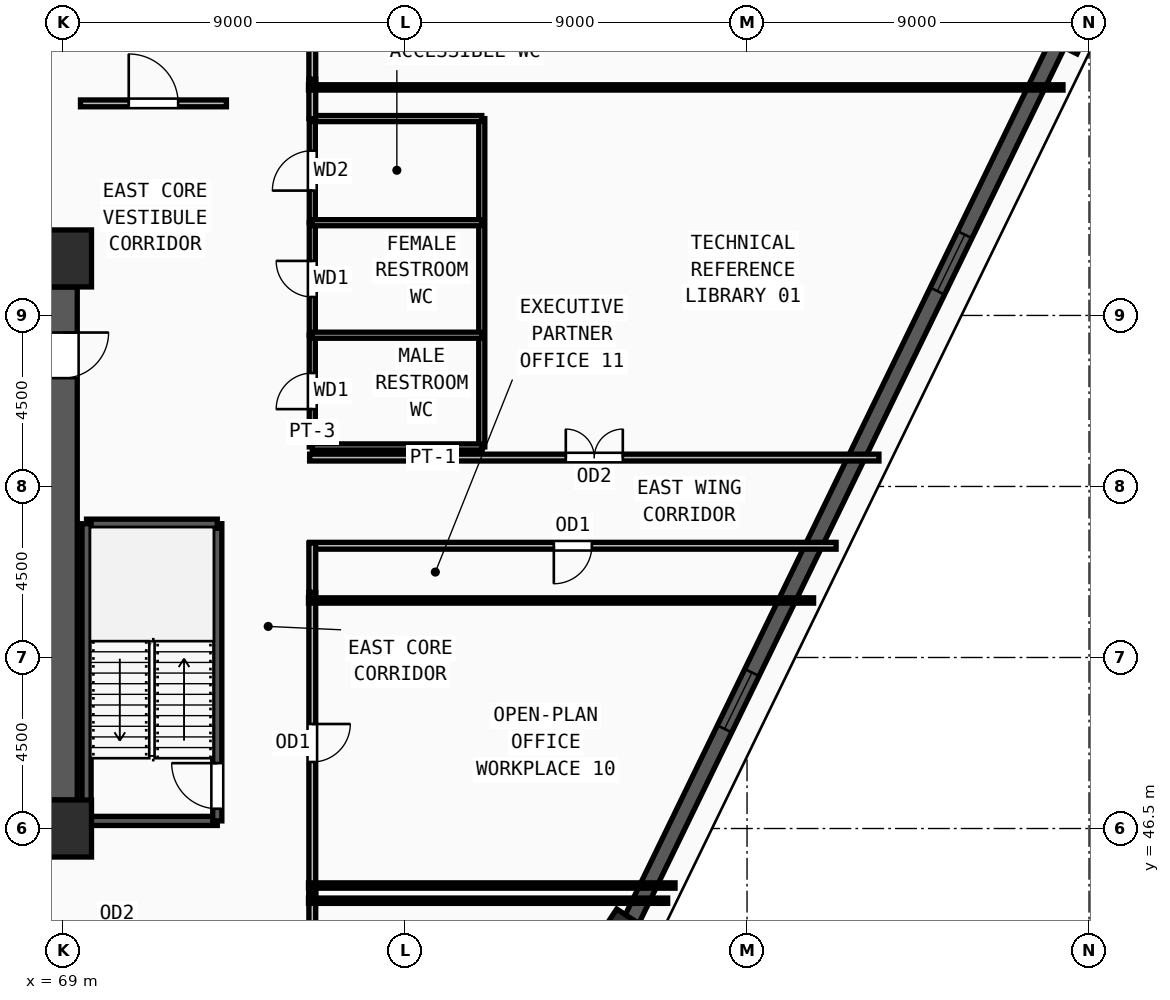
"""IFC4 building model, lengths in metres.
Left out: names, types, materials, properties, quantities, classifications, styles, units other than length and angle.
Written with IfcOpenShell. Run it as: python <this file> out.ifc"""

import sys

from ifc_helpers import new_model, si_unit, direction, frame, frame_2d, origin, origin_2d, place, context, subcontext, project, spatial, rectangle, extrude, source, transform, mapped, element, fill, save


model = new_model("IFC4")
c1 = context("Model", 3, precision=1e-05, world=origin(), true_north=direction((0.0, 1.0)))
c2 = subcontext(c1, "Body", "Model", "MODEL_VIEW")
j1 = project(units=[si_unit("LENGTHUNIT", "METRE"), si_unit("PLANEANGLEUNIT", "RADIAN")], contexts=[c1])
p1 = place(None, origin())
s1 = spatial("IfcSite", under=j1, at=p1, CompositionType="ELEMENT")
p2 = place(p1, origin())
s2 = spatial("IfcBuilding", under=s1, at=p2, CompositionType="ELEMENT")
p3 = place(p2, frame((0.0, 0.0, 144.0)))
s3 = spatial("IfcBuildingStorey", under=s2, at=p3, CompositionType="ELEMENT", Elevation=144.0)
m1 = source(origin(), c2, "Body", "SweptSolid", [
    extrude(rectangle(XDim=1.5, YDim=1.5, at=origin_2d()), origin(), (0.0, 0.0, 1.0), 3.75),
])
for number, where, z_axis, x_axis in (
    (1, (69.0, 46.5, 0.0), (0.0, 0.0, 1.0), (1.0, 0.0, 0.0)),
    (2, (69.0, 61.5, 0.0), (0.0, 0.0, 1.0), (1.0, 0.0, 0.0)),
):
    element("IfcColumn", number, at=place(p3, frame(where, z_axis=z_axis, x_axis=x_axis)), inside=s3, PredefinedType="COLUMN", context=c2, shape_type="MappedRepresentation", body=[
        mapped(m1, transform((0.0, 0.0, 0.0), x_axis=(1.0, 0.0, 0.0), y_axis=(0.0, 1.0, 0.0), z_axis=(0.0, 0.0, 1.0), scale=1.0)),
    ])
m2 = source(origin(), c2, "Body", "SweptSolid", [
    extrude(rectangle(XDim=1.4, YDim=1.15, at=origin_2d()), origin(), (0.0, 0.0, 1.0), 3.75),
])
for number, where, z_axis, x_axis in (
    (3, (95.472, 67.764, 0.0), (0.0, 0.0, 1.0), (0.437, 0.899, 0.0)),
    (4, (83.666, 43.481, 0.0), (0.0, 0.0, 1.0), (0.55, 0.835, 0.0)),
):
    element("IfcColumn", number, at=place(p3, frame(where, z_axis=z_axis, x_axis=x_axis)), inside=s3, PredefinedType="COLUMN", context=c2, shape_type="MappedRepresentation", body=[
        mapped(m2, transform((0.0, 0.0, 0.0), x_axis=(1.0, 0.0, 0.0), y_axis=(0.0, 1.0, 0.0), z_axis=(0.0, 0.0, 1.0), scale=1.0)),
    ])
p4 = place(p3, frame((83.968, 44.102, 0.0), z_axis=(0.0, 0.0, 1.0), x_axis=(0.437237241279, 0.899346204105, 0.0)))
e5 = element("IfcWall", 5, at=p4, inside=s3, PredefinedType="SOLIDWALL", context=c2, shape_type="SweptSolid", body=[
    extrude(rectangle(XDim=25.62, YDim=0.42, at=frame_2d((12.81, 0.0))), origin(), (0.0, 0.0, 1.0), 3.57),
])
m3 = source(origin(), c2, "Body", "SweptSolid", [
    extrude(rectangle(XDim=1.65, YDim=1.95, at=frame_2d((0.825, 0.975))), frame((0.0, 0.22, 0.0), z_axis=(0.0, -1.0, 0.0), x_axis=(1.0, 0.0, 0.0)), (0.0, 0.0, 1.0), 0.44),
])
p5 = place(p4, frame((5.58, 0.0, 0.55)))
e6 = element("IfcOpeningElement", 6, at=p5, cuts=e5, PredefinedType="OPENING", context=c2, shape_type="MappedRepresentation", body=[
    mapped(m3, transform((0.0, 0.0, 0.0), x_axis=(1.0, 0.0, 0.0), y_axis=(0.0, 1.0, 0.0), z_axis=(0.0, 0.0, 1.0), scale=1.0)),
])
p6 = place(p4, frame((18.39, 0.0, 0.55)))
e7 = element("IfcOpeningElement", 7, at=p6, cuts=e5, PredefinedType="OPENING", context=c2, shape_type="MappedRepresentation", body=[
    mapped(m3, transform((0.0, 0.0, 0.0), x_axis=(1.0, 0.0, 0.0), y_axis=(0.0, 1.0, 0.0), z_axis=(0.0, 0.0, 1.0), scale=1.0)),
])
p7 = place(p3, frame((69.0, 60.75, 0.0), z_axis=(0.0, 0.0, 1.0), x_axis=(0.0, -1.0, 0.0)))
e8 = element("IfcWall", 8, at=p7, inside=s3, PredefinedType="SHEAR", context=c2, shape_type="SweptSolid", body=[
    extrude(rectangle(XDim=13.5, YDim=0.75, at=frame_2d((6.75, 0.0))), origin(), (0.0, 0.0, 1.0), 3.57),
])
m4 = source(origin(), c2, "Body", "SweptSolid", [
    extrude(rectangle(XDim=1.2, YDim=2.2, at=frame_2d((0.6, 1.1))), frame((0.0, 0.385, 0.0), z_axis=(0.0, -1.0, 0.0), x_axis=(1.0, 0.0, 0.0)), (0.0, 0.0, 1.0), 0.77),
])
p8 = place(p7, frame((1.2, 0.0, 0.0)))
e9 = element("IfcOpeningElement", 9, at=p8, cuts=e8, PredefinedType="OPENING", context=c2, shape_type="MappedRepresentation", body=[
    mapped(m4, transform((0.0, 0.0, 0.0), x_axis=(1.0, 0.0, 0.0), y_axis=(0.0, 1.0, 0.0), z_axis=(0.0, 0.0, 1.0), scale=1.0)),
])
p9 = place(p3, frame((69.62, 46.7, 0.0), z_axis=(0.0, 0.0, 1.0), x_axis=(1.0, 0.0, 0.0)))
e10 = element("IfcWall", 10, at=p9, inside=s3, PredefinedType="SOLIDWALL", context=c2, shape_type="SweptSolid", body=[
    extrude(rectangle(XDim=3.44, YDim=0.24, at=frame_2d((1.72, 0.0))), origin(), (0.0, 0.0, 1.0), 3.57),
])
p10 = place(p3, frame((73.06, 46.7, 0.0), z_axis=(0.0, 0.0, 1.0), x_axis=(0.0, 1.0, 0.0)))
e11 = element("IfcWall", 11, at=p10, inside=s3, PredefinedType="SOLIDWALL", context=c2, shape_type="SweptSolid", body=[
    extrude(rectangle(XDim=7.82, YDim=0.24, at=frame_2d((3.91, 0.0))), origin(), (0.0, 0.0, 1.0), 3.57),
])
m5 = source(origin(), c2, "Body", "SweptSolid", [
    extrude(rectangle(XDim=1.2, YDim=2.2, at=frame_2d((0.6, 1.1))), frame((0.0, 0.13, 0.0), z_axis=(0.0, -1.0, 0.0), x_axis=(1.0, 0.0, 0.0)), (0.0, 0.0, 1.0), 0.26),
])
p11 = place(p10, frame((0.32, 0.0, 0.0)))
e12 = element("IfcOpeningElement", 12, at=p11, cuts=e11, PredefinedType="OPENING", context=c2, shape_type="MappedRepresentation", body=[
    mapped(m5, transform((0.0, 0.0, 0.0), x_axis=(1.0, 0.0, 0.0), y_axis=(0.0, 1.0, 0.0), z_axis=(0.0, 0.0, 1.0), scale=1.0)),
])
p12 = place(p3, frame((73.06, 54.52, 0.0), z_axis=(0.0, 0.0, 1.0), x_axis=(-1.0, 0.0, 0.0)))
e13 = element("IfcWall", 13, at=p12, inside=s3, PredefinedType="SOLIDWALL", context=c2, shape_type="SweptSolid", body=[
    extrude(rectangle(XDim=3.44, YDim=0.24, at=frame_2d((1.72, 0.0))), origin(), (0.0, 0.0, 1.0), 3.57),
])
p13 = place(p3, frame((69.62, 54.52, 0.0), z_axis=(0.0, 0.0, 1.0), x_axis=(0.0, -1.0, 0.0)))
e14 = element("IfcWall", 14, at=p13, inside=s3, PredefinedType="SOLIDWALL", context=c2, shape_type="SweptSolid", body=[
    extrude(rectangle(XDim=7.82, YDim=0.24, at=frame_2d((3.91, 0.0))), origin(), (0.0, 0.0, 1.0), 3.57),
])
p14 = place(p3, frame((75.56, 56.54, 0.0), z_axis=(0.0, 0.0, 1.0), x_axis=(0.0, 1.0, 0.0)))
e15 = element("IfcWall", 15, at=p14, inside=s3, PredefinedType="PARTITIONING", context=c2, shape_type="SweptSolid", body=[
    extrude(rectangle(XDim=2.94, YDim=0.16, at=frame_2d((1.47, 0.0))), origin(), (0.0, 0.0, 1.0), 3.57),
])
m6 = source(origin(), c2, "Body", "SweptSolid", [
    extrude(rectangle(XDim=0.95, YDim=2.15, at=frame_2d((0.475, 1.075))), frame((0.0, 0.09, 0.0), z_axis=(0.0, -1.0, 0.0), x_axis=(1.0, 0.0, 0.0)), (0.0, 0.0, 1.0), 0.18),
])
p15 = place(p14, frame((0.995, 0.0, 0.0)))
e16 = element("IfcOpeningElement", 16, at=p15, cuts=e15, PredefinedType="OPENING", context=c2, shape_type="MappedRepresentation", body=[
    mapped(m6, transform((0.0, 0.0, 0.0), x_axis=(1.0, 0.0, 0.0), y_axis=(0.0, 1.0, 0.0), z_axis=(0.0, 0.0, 1.0), scale=1.0)),
])
p16 = place(p3, frame((75.56, 59.48, 0.0), z_axis=(0.0, 0.0, 1.0), x_axis=(0.0, 1.0, 0.0)))
e17 = element("IfcWall", 17, at=p16, inside=s3, PredefinedType="PARTITIONING", context=c2, shape_type="SweptSolid", body=[
    extrude(rectangle(XDim=2.96, YDim=0.16, at=frame_2d((1.48, 0.0))), origin(), (0.0, 0.0, 1.0), 3.57),
])
p17 = place(p16, frame((1.005, 0.0, 0.0)))
e18 = element("IfcOpeningElement", 18, at=p17, cuts=e17, PredefinedType="OPENING", context=c2, shape_type="MappedRepresentation", body=[
    mapped(m6, transform((0.0, 0.0, 0.0), x_axis=(1.0, 0.0, 0.0), y_axis=(0.0, 1.0, 0.0), z_axis=(0.0, 0.0, 1.0), scale=1.0)),
])
p18 = place(p3, frame((75.56, 62.44, 0.0), z_axis=(0.0, 0.0, 1.0), x_axis=(0.0, 1.0, 0.0)))
e19 = element("IfcWall", 19, at=p18, inside=s3, PredefinedType="PARTITIONING", context=c2, shape_type="SweptSolid", body=[
    extrude(rectangle(XDim=2.74, YDim=0.16, at=frame_2d((1.37, 0.0))), origin(), (0.0, 0.0, 1.0), 3.57),
])
m7 = source(origin(), c2, "Body", "SweptSolid", [
    extrude(rectangle(XDim=1.05, YDim=2.15, at=frame_2d((0.525, 1.075))), frame((0.0, 0.09, 0.0), z_axis=(0.0, -1.0, 0.0), x_axis=(1.0, 0.0, 0.0)), (0.0, 0.0, 1.0), 0.18),
])
p19 = place(p18, frame((0.845, 0.0, 0.0)))
e20 = element("IfcOpeningElement", 20, at=p19, cuts=e19, PredefinedType="OPENING", context=c2, shape_type="MappedRepresentation", body=[
    mapped(m7, transform((0.0, 0.0, 0.0), x_axis=(1.0, 0.0, 0.0), y_axis=(0.0, 1.0, 0.0), z_axis=(0.0, 0.0, 1.0), scale=1.0)),
])
p20 = place(p3, frame((69.46, 65.58, 0.0), z_axis=(0.0, 0.0, 1.0), x_axis=(1.0, 0.0, 0.0)))
e21 = element("IfcWall", 21, at=p20, inside=s3, PredefinedType="PARTITIONING", context=c2, shape_type="SweptSolid", body=[
    extrude(rectangle(XDim=3.84, YDim=0.18, at=frame_2d((1.92, 0.0))), origin(), (0.0, 0.0, 1.0), 3.57),
])
m8 = source(origin(), c2, "Body", "SweptSolid", [
    extrude(rectangle(XDim=1.3, YDim=2.2, at=frame_2d((0.65, 1.1))), frame((0.0, 0.1, 0.0), z_axis=(0.0, -1.0, 0.0), x_axis=(1.0, 0.0, 0.0)), (0.0, 0.0, 1.0), 0.2),
])
p21 = place(p20, frame((1.27, 0.0, 0.0)))
e22 = element("IfcOpeningElement", 22, at=p21, cuts=e21, PredefinedType="OPENING", context=c2, shape_type="MappedRepresentation", body=[
    mapped(m8, transform((0.0, 0.0, 0.0), x_axis=(1.0, 0.0, 0.0), y_axis=(0.0, 1.0, 0.0), z_axis=(0.0, 0.0, 1.0), scale=1.0)),
])
p22 = place(p3, frame((75.49, 56.26, 0.0), z_axis=(0.0, 0.0, 1.0), x_axis=(1.0, 0.0, 0.0)))
e23 = element("IfcWall", 23, at=p22, inside=s3, PredefinedType="PARTITIONING", context=c2, shape_type="SweptSolid", body=[
    extrude(rectangle(XDim=14.981, YDim=0.18, at=frame_2d((7.49, 0.0))), origin(), (0.0, 0.0, 1.0), 3.57),
])
m9 = source(origin(), c2, "Body", "SweptSolid", [
    extrude(rectangle(XDim=1.5, YDim=2.2, at=frame_2d((0.75, 1.1))), frame((0.0, 0.1, 0.0), z_axis=(0.0, -1.0, 0.0), x_axis=(1.0, 0.0, 0.0)), (0.0, 0.0, 1.0), 0.2),
])
p23 = place(p22, frame((6.741, 0.0, 0.0)))
e24 = element("IfcOpeningElement", 24, at=p23, cuts=e23, PredefinedType="OPENING", context=c2, shape_type="MappedRepresentation", body=[
    mapped(m9, transform((0.0, 0.0, 0.0), x_axis=(1.0, 0.0, 0.0), y_axis=(0.0, 1.0, 0.0), z_axis=(0.0, 0.0, 1.0), scale=1.0)),
])
p24 = place(p3, frame((75.56, 52.715, 0.0), z_axis=(0.0, 0.0, 1.0), x_axis=(0.0, -1.0, 0.0)))
e25 = element("IfcWall", 25, at=p24, inside=s3, PredefinedType="PARTITIONING", context=c2, shape_type="SweptSolid", body=[
    extrude(rectangle(XDim=7.93, YDim=0.18, at=frame_2d((3.965, 0.0))), origin(), (0.0, 0.0, 1.0), 3.155),
])
m10 = source(origin(), c2, "Body", "SweptSolid", [
    extrude(rectangle(XDim=1.0, YDim=2.2, at=frame_2d((0.5, 1.1))), frame((0.0, 0.1, 0.0), z_axis=(0.0, -1.0, 0.0), x_axis=(1.0, 0.0, 0.0)), (0.0, 0.0, 1.0), 0.2),
])
p25 = place(p24, frame((3.465, 0.0, 0.0)))
e26 = element("IfcOpeningElement", 26, at=p25, cuts=e25, PredefinedType="OPENING", context=c2, shape_type="MappedRepresentation", body=[
    mapped(m10, transform((0.0, 0.0, 0.0), x_axis=(1.0, 0.0, 0.0), y_axis=(0.0, 1.0, 0.0), z_axis=(0.0, 0.0, 1.0), scale=1.0)),
])
p26 = place(p3, frame((89.343, 53.94, 0.0), z_axis=(0.0, 0.0, 1.0), x_axis=(-1.0, 0.0, 0.0)))
e27 = element("IfcWall", 27, at=p26, inside=s3, PredefinedType="PARTITIONING", context=c2, shape_type="SweptSolid", body=[
    extrude(rectangle(XDim=13.853, YDim=0.18, at=frame_2d((6.927, 0.0))), origin(), (0.0, 0.0, 1.0), 3.57),
])
p27 = place(p26, frame((6.427, 0.0, 0.0)))
e28 = element("IfcOpeningElement", 28, at=p27, cuts=e27, PredefinedType="OPENING", context=c2, shape_type="MappedRepresentation", body=[
    mapped(m10, transform((0.0, 0.0, 0.0), x_axis=(1.0, 0.0, 0.0), y_axis=(0.0, 1.0, 0.0), z_axis=(0.0, 0.0, 1.0), scale=1.0)),
])
p28 = place(p3, frame((80.02, 56.54, 0.0), z_axis=(0.0, 0.0, 1.0), x_axis=(0.0, 1.0, 0.0)))
e29 = element("IfcWall", 29, at=p28, inside=s3, PredefinedType="PARTITIONING", context=c2, shape_type="SweptSolid", body=[
    extrude(rectangle(XDim=8.64, YDim=0.16, at=frame_2d((4.32, 0.0))), origin(), (0.0, 0.0, 1.0), 3.155),
])
for number, where, z_axis, x_axis in (
    (30, (75.56, 56.54, 0.0), (0.0, 0.0, 1.0), (1.0, 0.0, 0.0)),
    (31, (75.56, 59.48, 0.0), (0.0, 0.0, 1.0), (1.0, 0.0, 0.0)),
    (32, (75.56, 62.44, 0.0), (0.0, 0.0, 1.0), (1.0, 0.0, 0.0)),
    (33, (75.56, 65.18, 0.0), (0.0, 0.0, 1.0), (1.0, 0.0, 0.0)),
):
    element("IfcWall", number, at=place(p3, frame(where, z_axis=z_axis, x_axis=x_axis)), inside=s3, PredefinedType="PARTITIONING", context=c2, shape_type="SweptSolid", body=[
        extrude(rectangle(XDim=4.46, YDim=0.16, at=frame_2d((2.23, 0.0))), origin(), (0.0, 0.0, 1.0), 3.57),
    ])
p29 = place(p3, frame((75.56, 66.215, 0.0), z_axis=(0.0, 0.0, 1.0), x_axis=(0.0, -1.0, 0.0)))
e34 = element("IfcWall", 34, at=p29, inside=s3, PredefinedType="PARTITIONING", context=c2, shape_type="SweptSolid", body=[
    extrude(rectangle(XDim=1.035, YDim=0.18, at=frame_2d((0.518, 0.0))), origin(), (0.0, 0.0, 1.0), 3.57),
])
p30 = place(p3, frame((75.56, 67.98, 0.0), z_axis=(0.0, 0.0, 1.0), x_axis=(0.0, -1.0, 0.0)))
e35 = element("IfcWall", 35, at=p30, inside=s3, PredefinedType="PARTITIONING", context=c2, shape_type="SweptSolid", body=[
    extrude(rectangle(XDim=1.765, YDim=0.18, at=frame_2d((0.882, 0.0))), origin(), (0.0, 0.0, 1.0), 3.57),
])
p31 = place(p3, frame((75.56, 44.785, 0.0), z_axis=(0.0, 0.0, 1.0), x_axis=(0.0, -1.0, 0.0)))
e36 = element("IfcWall", 36, at=p31, inside=s3, PredefinedType="PARTITIONING", context=c2, shape_type="SweptSolid", body=[
    extrude(rectangle(XDim=1.115, YDim=0.18, at=frame_2d((0.558, 0.0))), origin(), (0.0, 0.0, 1.0), 3.57),
])
p32 = place(p3, frame((75.56, 54.01, 0.0), z_axis=(0.0, 0.0, 1.0), x_axis=(0.0, -1.0, 0.0)))
e37 = element("IfcWall", 37, at=p32, inside=s3, PredefinedType="PARTITIONING", context=c2, shape_type="SweptSolid", body=[
    extrude(rectangle(XDim=1.295, YDim=0.18, at=frame_2d((0.647, 0.0))), origin(), (0.0, 0.0, 1.0), 3.57),
])
p33 = place(p3, frame((75.46, 44.6, 0.0), z_axis=(0.0, 0.0, 1.0), x_axis=(1.0, 0.0, 0.0)))
e38 = element("IfcWall", 38, at=p33, inside=s3, PredefinedType="PARTITIONING", context=c2, shape_type="SweptSolid", body=[
    extrude(rectangle(XDim=9.451, YDim=0.14, at=frame_2d((4.726, 0.0))), origin(), (0.0, 0.0, 1.0), 3.57),
])
p34 = place(p3, frame((75.46, 45.0, 0.0), z_axis=(0.0, 0.0, 1.0), x_axis=(1.0, 0.0, 0.0)))
e39 = element("IfcWall", 39, at=p34, inside=s3, PredefinedType="PARTITIONING", context=c2, shape_type="SweptSolid", body=[
    extrude(rectangle(XDim=9.645, YDim=0.14, at=frame_2d((4.823, 0.0))), origin(), (0.0, 0.0, 1.0), 3.57),
])
p35 = place(p3, frame((75.46, 52.5, 0.0), z_axis=(0.0, 0.0, 1.0), x_axis=(1.0, 0.0, 0.0)))
e40 = element("IfcWall", 40, at=p35, inside=s3, PredefinedType="PARTITIONING", context=c2, shape_type="SweptSolid", body=[
    extrude(rectangle(XDim=13.291, YDim=0.14, at=frame_2d((6.646, 0.0))), origin(), (0.0, 0.0, 1.0), 3.57),
])
p36 = place(p3, frame((75.46, 66.0, 0.0), z_axis=(0.0, 0.0, 1.0), x_axis=(1.0, 0.0, 0.0)))
e41 = element("IfcWall", 41, at=p36, inside=s3, PredefinedType="PARTITIONING", context=c2, shape_type="SweptSolid", body=[
    extrude(rectangle(XDim=19.854, YDim=0.14, at=frame_2d((9.927, 0.0))), origin(), (0.0, 0.0, 1.0), 2.755),
])
m11 = source(origin(), c2, "Body", "SweptSolid", [
    extrude(rectangle(XDim=1.65, YDim=1.95, at=frame_2d((0.825, 0.975))), frame((0.0, 0.03, 0.0), z_axis=(0.0, -1.0, 0.0), x_axis=(1.0, 0.0, 0.0)), (0.0, 0.0, 1.0), 0.06),
])
p37 = place(p5, origin())
e42 = element("IfcWindow", 42, at=p37, inside=s3, PartitioningType="DOUBLE_PANEL_VERTICAL", PredefinedType="WINDOW", context=c2, shape_type="MappedRepresentation", body=[
    mapped(m11, transform((0.0, 0.0, 0.0), x_axis=(1.0, 0.0, 0.0), y_axis=(0.0, 1.0, 0.0), z_axis=(0.0, 0.0, 1.0), scale=1.0)),
])
fill(e6, e42)
p38 = place(p6, origin())
e43 = element("IfcWindow", 43, at=p38, inside=s3, PartitioningType="DOUBLE_PANEL_VERTICAL", PredefinedType="WINDOW", context=c2, shape_type="MappedRepresentation", body=[
    mapped(m11, transform((0.0, 0.0, 0.0), x_axis=(1.0, 0.0, 0.0), y_axis=(0.0, 1.0, 0.0), z_axis=(0.0, 0.0, 1.0), scale=1.0)),
])
fill(e7, e43)
m12 = source(origin(), c2, "Body", "SweptSolid", [
    extrude(rectangle(XDim=1.2, YDim=2.2, at=frame_2d((0.6, 1.1))), frame((0.0, 0.025, 0.0), z_axis=(0.0, -1.0, 0.0), x_axis=(1.0, 0.0, 0.0)), (0.0, 0.0, 1.0), 0.05),
])
p39 = place(p8, origin())
e44 = element("IfcDoor", 44, at=p39, inside=s3, OperationType="SINGLE_SWING_LEFT", PredefinedType="DOOR", context=c2, shape_type="MappedRepresentation", body=[
    mapped(m12, transform((0.0, 0.0, 0.0), x_axis=(1.0, 0.0, 0.0), y_axis=(0.0, 1.0, 0.0), z_axis=(0.0, 0.0, 1.0), scale=1.0)),
])
fill(e9, e44)
p40 = place(p11, origin())
e45 = element("IfcDoor", 45, at=p40, inside=s3, OperationType="SINGLE_SWING_RIGHT", PredefinedType="DOOR", context=c2, shape_type="MappedRepresentation", body=[
    mapped(m12, transform((0.0, 0.0, 0.0), x_axis=(1.0, 0.0, 0.0), y_axis=(0.0, 1.0, 0.0), z_axis=(0.0, 0.0, 1.0), scale=1.0)),
])
fill(e12, e45)
m13 = source(origin(), c2, "Body", "SweptSolid", [
    extrude(rectangle(XDim=0.95, YDim=2.15, at=frame_2d((0.475, 1.075))), frame((0.0, 0.025, 0.0), z_axis=(0.0, -1.0, 0.0), x_axis=(1.0, 0.0, 0.0)), (0.0, 0.0, 1.0), 0.05),
])
p41 = place(p15, origin())
e46 = element("IfcDoor", 46, at=p41, inside=s3, OperationType="SINGLE_SWING_LEFT", PredefinedType="DOOR", context=c2, shape_type="MappedRepresentation", body=[
    mapped(m13, transform((0.0, 0.0, 0.0), x_axis=(1.0, 0.0, 0.0), y_axis=(0.0, 1.0, 0.0), z_axis=(0.0, 0.0, 1.0), scale=1.0)),
])
fill(e16, e46)
p42 = place(p17, origin())
e47 = element("IfcDoor", 47, at=p42, inside=s3, OperationType="SINGLE_SWING_RIGHT", PredefinedType="DOOR", context=c2, shape_type="MappedRepresentation", body=[
    mapped(m13, transform((0.0, 0.0, 0.0), x_axis=(1.0, 0.0, 0.0), y_axis=(0.0, 1.0, 0.0), z_axis=(0.0, 0.0, 1.0), scale=1.0)),
])
fill(e18, e47)
m14 = source(origin(), c2, "Body", "SweptSolid", [
    extrude(rectangle(XDim=1.05, YDim=2.15, at=frame_2d((0.525, 1.075))), frame((0.0, 0.025, 0.0), z_axis=(0.0, -1.0, 0.0), x_axis=(1.0, 0.0, 0.0)), (0.0, 0.0, 1.0), 0.05),
])
p43 = place(p19, origin())
e48 = element("IfcDoor", 48, at=p43, inside=s3, OperationType="SINGLE_SWING_LEFT", PredefinedType="DOOR", context=c2, shape_type="MappedRepresentation", body=[
    mapped(m14, transform((0.0, 0.0, 0.0), x_axis=(1.0, 0.0, 0.0), y_axis=(0.0, 1.0, 0.0), z_axis=(0.0, 0.0, 1.0), scale=1.0)),
])
fill(e20, e48)
m15 = source(origin(), c2, "Body", "SweptSolid", [
    extrude(rectangle(XDim=1.3, YDim=2.2, at=frame_2d((0.65, 1.1))), frame((0.0, 0.025, 0.0), z_axis=(0.0, -1.0, 0.0), x_axis=(1.0, 0.0, 0.0)), (0.0, 0.0, 1.0), 0.05),
])
p44 = place(p21, origin())
e49 = element("IfcDoor", 49, at=p44, inside=s3, OperationType="SINGLE_SWING_LEFT", PredefinedType="DOOR", context=c2, shape_type="MappedRepresentation", body=[
    mapped(m15, transform((0.0, 0.0, 0.0), x_axis=(1.0, 0.0, 0.0), y_axis=(0.0, 1.0, 0.0), z_axis=(0.0, 0.0, 1.0), scale=1.0)),
])
fill(e22, e49)
m16 = source(origin(), c2, "Body", "SweptSolid", [
    extrude(rectangle(XDim=1.5, YDim=2.2, at=frame_2d((0.75, 1.1))), frame((0.0, 0.025, 0.0), z_axis=(0.0, -1.0, 0.0), x_axis=(1.0, 0.0, 0.0)), (0.0, 0.0, 1.0), 0.05),
])
p45 = place(p23, origin())
e50 = element("IfcDoor", 50, at=p45, inside=s3, OperationType="DOUBLE_DOOR_SINGLE_SWING", PredefinedType="DOOR", context=c2, shape_type="MappedRepresentation", body=[
    mapped(m16, transform((0.0, 0.0, 0.0), x_axis=(1.0, 0.0, 0.0), y_axis=(0.0, 1.0, 0.0), z_axis=(0.0, 0.0, 1.0), scale=1.0)),
])
fill(e24, e50)
m17 = source(origin(), c2, "Body", "SweptSolid", [
    extrude(rectangle(XDim=1.0, YDim=2.2, at=frame_2d((0.5, 1.1))), frame((0.0, 0.025, 0.0), z_axis=(0.0, -1.0, 0.0), x_axis=(1.0, 0.0, 0.0)), (0.0, 0.0, 1.0), 0.05),
])
p46 = place(p25, origin())
e51 = element("IfcDoor", 51, at=p46, inside=s3, OperationType="SINGLE_SWING_LEFT", PredefinedType="DOOR", context=c2, shape_type="MappedRepresentation", body=[
    mapped(m17, transform((0.0, 0.0, 0.0), x_axis=(1.0, 0.0, 0.0), y_axis=(0.0, 1.0, 0.0), z_axis=(0.0, 0.0, 1.0), scale=1.0)),
])
fill(e26, e51)
p47 = place(p27, origin())
e52 = element("IfcDoor", 52, at=p47, inside=s3, OperationType="SINGLE_SWING_RIGHT", PredefinedType="DOOR", context=c2, shape_type="MappedRepresentation", body=[
    mapped(m17, transform((0.0, 0.0, 0.0), x_axis=(1.0, 0.0, 0.0), y_axis=(0.0, 1.0, 0.0), z_axis=(0.0, 0.0, 1.0), scale=1.0)),
])
fill(e28, e52)
save(model, sys.argv[1])
